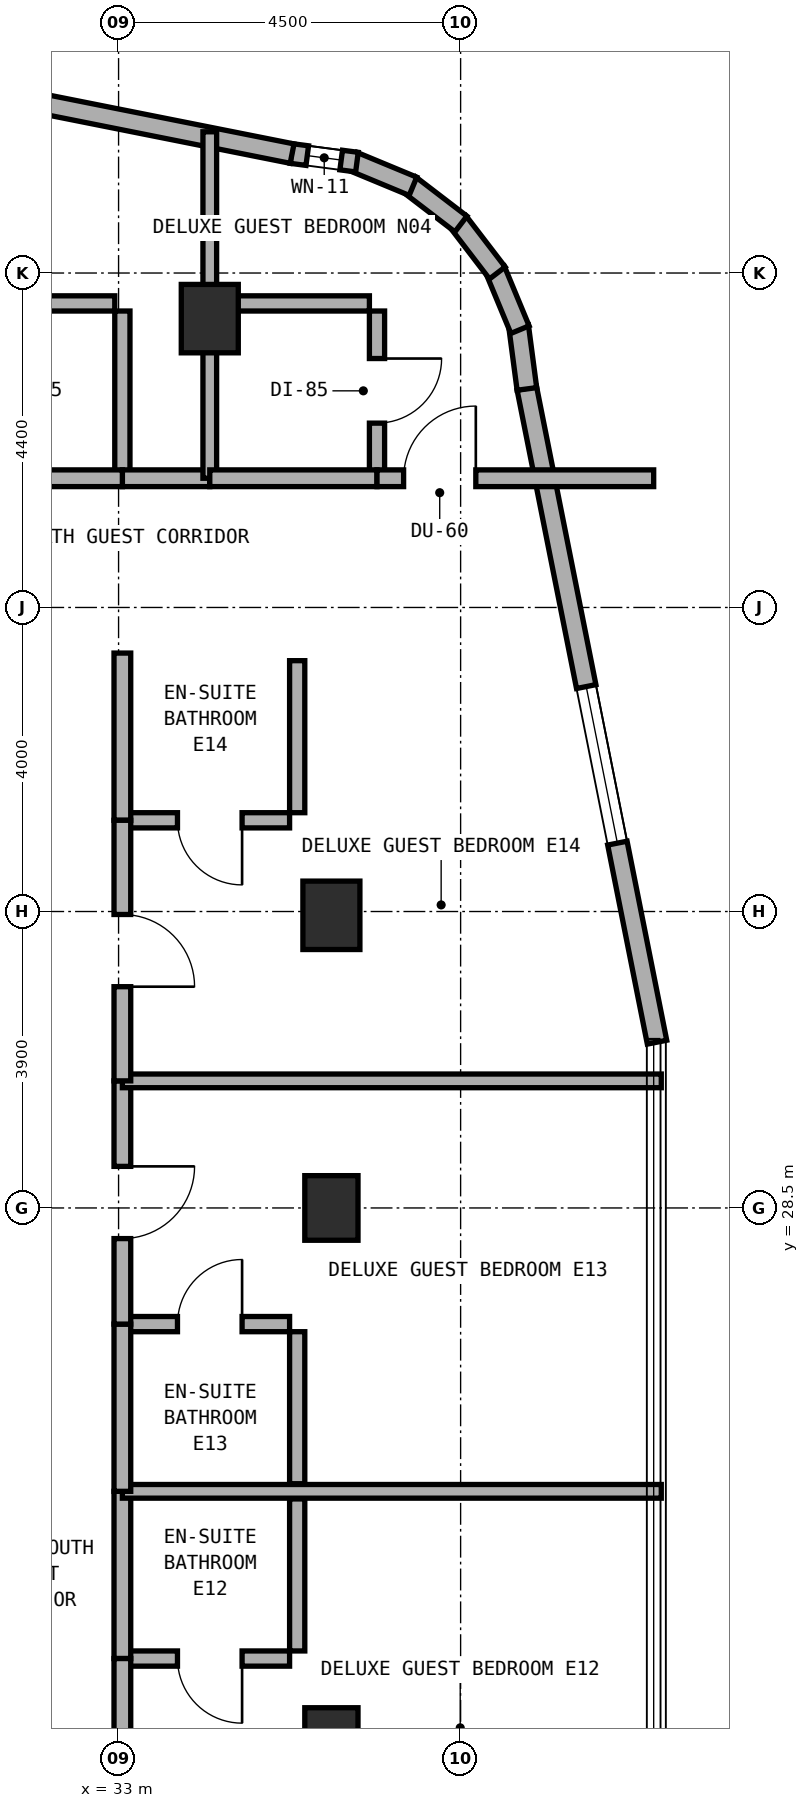
"""IFC4 building model, lengths in metres.
Left out: names, types, materials, properties, quantities, classifications, styles, units other than length and angle.
Written with IfcOpenShell. Run it as: python <this file> out.ifc"""

import sys

from ifc_helpers import new_model, si_unit, direction, frame, frame_2d, origin, origin_2d, place, context, subcontext, project, spatial, rectangle, extrude, element, fill, save


model = new_model("IFC4")
c1 = context("Model", 3, precision=1e-05, world=origin(), true_north=direction((0.0, 1.0)))
c2 = subcontext(c1, "Body", "Model", "MODEL_VIEW")
j1 = project(units=[si_unit("LENGTHUNIT", "METRE"), si_unit("PLANEANGLEUNIT", "RADIAN")], contexts=[c1])
p1 = place(None, origin())
s1 = spatial("IfcSite", under=j1, at=p1, CompositionType="ELEMENT")
p2 = place(p1, origin())
s2 = spatial("IfcBuilding", under=s1, at=p2, CompositionType="ELEMENT")
p3 = place(p2, frame((0.0, 0.0, 224.3)))
s3 = spatial("IfcBuildingStorey", under=s2, at=p3, CompositionType="ELEMENT", Elevation=224.3)
p4 = place(p3, frame((34.2, 40.2, 0.0), z_axis=(0.0, 0.0, 1.0), x_axis=(1.0, 0.0, 0.0)))
e1 = element("IfcColumn", 1, at=p4, inside=s3, PredefinedType="COLUMN", context=c2, shape_type="SweptSolid", body=[
    extrude(rectangle(XDim=0.75, YDim=0.9, at=origin_2d()), origin(), (0.0, 0.0, 1.0), 3.6),
])
for number, where, z_axis, x_axis in (
    (2, (35.8, 21.5, 0.0), (0.0, 0.0, 1.0), (1.0, 0.0, 0.0)),
    (3, (35.8, 28.5, 0.0), (0.0, 0.0, 1.0), (1.0, 0.0, 0.0)),
):
    element("IfcColumn", number, at=place(p3, frame(where, z_axis=z_axis, x_axis=x_axis)), inside=s3, PredefinedType="COLUMN", context=c2, shape_type="SweptSolid", body=[
        extrude(rectangle(XDim=0.7, YDim=0.85, at=origin_2d()), origin(), (0.0, 0.0, 1.0), 3.6),
    ])
p5 = place(p3, frame((35.8, 32.35, 0.0), z_axis=(0.0, 0.0, 1.0), x_axis=(1.0, 0.0, 0.0)))
e4 = element("IfcColumn", 4, at=p5, inside=s3, PredefinedType="COLUMN", context=c2, shape_type="SweptSolid", body=[
    extrude(rectangle(XDim=0.75, YDim=0.9, at=origin_2d()), origin(), (0.0, 0.0, 1.0), 3.6),
])
p6 = place(p3, frame((40.084, 30.681, 0.0), z_axis=(0.0, 0.0, 1.0), x_axis=(-0.195291715883, 0.980745199176, 0.0)))
e5 = element("IfcWall", 5, at=p6, inside=s3, PredefinedType="STANDARD", context=c2, shape_type="SweptSolid", body=[
    extrude(rectangle(XDim=8.771, YDim=0.26, at=frame_2d((4.385, 0.0))), origin(), (0.0, 0.0, 1.0), 3.32),
])
p7 = place(p6, frame((2.67, 0.0, 0.85)))
e6 = element("IfcOpeningElement", 6, at=p7, cuts=e5, PredefinedType="OPENING", context=c2, shape_type="SweptSolid", body=[
    extrude(rectangle(XDim=2.1, YDim=1.5, at=frame_2d((1.05, 0.75))), frame((0.0, 0.14, 0.0), z_axis=(0.0, -1.0, 0.0), x_axis=(1.0, 0.0, 0.0)), (0.0, 0.0, 1.0), 0.28),
])
p8 = place(p3, frame((38.372, 39.275, 0.0), z_axis=(0.0, 0.0, 1.0), x_axis=(-0.130954667764, 0.9913883573, 0.0)))
e7 = element("IfcWall", 7, at=p8, inside=s3, PredefinedType="STANDARD", context=c2, shape_type="SweptSolid", body=[
    extrude(rectangle(XDim=0.833, YDim=0.26, at=frame_2d((0.417, 0.0))), origin(), (0.0, 0.0, 1.0), 3.32),
])
p9 = place(p3, frame((38.281, 40.055, 0.0), z_axis=(0.0, 0.0, 1.0), x_axis=(-0.382985169477, 0.923754491172, 0.0)))
e8 = element("IfcWall", 8, at=p9, inside=s3, PredefinedType="STANDARD", context=c2, shape_type="SweptSolid", body=[
    extrude(rectangle(XDim=0.851, YDim=0.26, at=frame_2d((0.426, 0.0))), origin(), (0.0, 0.0, 1.0), 3.32),
])
for number, where, z_axis, x_axis in (
    (9, (37.983, 40.801, 0.0), (0.0, 0.0, 1.0), (-0.608, 0.794, 0.0)),
    (10, (37.504, 41.445, 0.0), (0.0, 0.0, 1.0), (-0.794, 0.608, 0.0)),
):
    element("IfcWall", number, at=place(p3, frame(where, z_axis=z_axis, x_axis=x_axis)), inside=s3, PredefinedType="STANDARD", context=c2, shape_type="SweptSolid", body=[
        extrude(rectangle(XDim=0.85, YDim=0.26, at=frame_2d((0.425, 0.0))), origin(), (0.0, 0.0, 1.0), 3.32),
    ])
p10 = place(p3, frame((36.873, 41.941, 0.0), z_axis=(0.0, 0.0, 1.0), x_axis=(-0.923652976167, 0.383229930484, 0.0)))
e11 = element("IfcWall", 11, at=p10, inside=s3, PredefinedType="STANDARD", context=c2, shape_type="SweptSolid", body=[
    extrude(rectangle(XDim=0.851, YDim=0.26, at=frame_2d((0.426, 0.0))), origin(), (0.0, 0.0, 1.0), 3.32),
])
p11 = place(p3, frame((36.136, 42.259, 0.0), z_axis=(0.0, 0.0, 1.0), x_axis=(-0.991493480548, 0.130156359936, 0.0)))
e12 = element("IfcWall", 12, at=p11, inside=s3, PredefinedType="STANDARD", context=c2, shape_type="SweptSolid", body=[
    extrude(rectangle(XDim=0.868, YDim=0.26, at=frame_2d((0.434, 0.0))), origin(), (0.0, 0.0, 1.0), 3.32),
])
p12 = place(p11, frame((0.209, 0.0, 0.85)))
e13 = element("IfcOpeningElement", 13, at=p12, cuts=e12, PredefinedType="OPENING", context=c2, shape_type="SweptSolid", body=[
    extrude(rectangle(XDim=0.45, YDim=1.5, at=frame_2d((0.225, 0.75))), frame((0.0, 0.14, 0.0), z_axis=(0.0, -1.0, 0.0), x_axis=(1.0, 0.0, 0.0)), (0.0, 0.0, 1.0), 0.28),
])
p13 = place(p3, frame((35.283, 42.371, 0.0), z_axis=(0.0, 0.0, 1.0), x_axis=(-0.980745199176, 0.195291715883, 0.0)))
e14 = element("IfcWall", 14, at=p13, inside=s3, PredefinedType="STANDARD", context=c2, shape_type="SweptSolid", body=[
    extrude(rectangle(XDim=8.771, YDim=0.26, at=frame_2d((4.385, 0.0))), origin(), (0.0, 0.0, 1.0), 3.32),
])
p14 = place(p13, frame((3.925, 0.0, 0.85)))
e15 = element("IfcOpeningElement", 15, at=p14, cuts=e14, PredefinedType="OPENING", context=c2, shape_type="SweptSolid", body=[
    extrude(rectangle(XDim=2.1, YDim=1.5, at=frame_2d((1.05, 0.75))), frame((0.0, 0.14, 0.0), z_axis=(0.0, -1.0, 0.0), x_axis=(1.0, 0.0, 0.0)), (0.0, 0.0, 1.0), 0.28),
])
p15 = place(p3, frame((30.95, 40.4, 0.0), z_axis=(0.0, 0.0, 1.0), x_axis=(1.0, 0.0, 0.0)))
e16 = element("IfcWall", 16, at=p15, inside=s3, PredefinedType="PLUMBINGWALL", context=c2, shape_type="SweptSolid", body=[
    extrude(rectangle(XDim=2.0, YDim=0.2, at=frame_2d((1.0, 0.0))), origin(), (0.0, 0.0, 1.0), 3.015),
])
p16 = place(p3, frame((33.05, 38.2, 0.0), z_axis=(0.0, 0.0, 1.0), x_axis=(0.0, 1.0, 0.0)))
e17 = element("IfcWall", 17, at=p16, inside=s3, PredefinedType="PLUMBINGWALL", context=c2, shape_type="SweptSolid", body=[
    extrude(rectangle(XDim=2.1, YDim=0.2, at=frame_2d((1.05, 0.0))), origin(), (0.0, 0.0, 1.0), 3.015),
])
p17 = place(p3, frame((33.05, 38.1, 0.0), z_axis=(0.0, 0.0, 1.0), x_axis=(1.0, 0.0, 0.0)))
e18 = element("IfcWall", 18, at=p17, inside=s3, PredefinedType="SOLIDWALL", context=c2, shape_type="SweptSolid", body=[
    extrude(rectangle(XDim=1.15, YDim=0.22, at=frame_2d((0.575, 0.0))), origin(), (0.0, 0.0, 1.0), 2.695),
])
p18 = place(p3, frame((30.85, 38.1, 0.0), z_axis=(0.0, 0.0, 1.0), x_axis=(1.0, 0.0, 0.0)))
e19 = element("IfcWall", 19, at=p18, inside=s3, PredefinedType="SOLIDWALL", context=c2, shape_type="SweptSolid", body=[
    extrude(rectangle(XDim=2.2, YDim=0.22, at=frame_2d((1.1, 0.0))), origin(), (0.0, 0.0, 1.0), 3.32),
])
p19 = place(p3, frame((34.2, 38.1, 0.0), z_axis=(0.0, 0.0, 1.0), x_axis=(0.0, 1.0, 0.0)))
e20 = element("IfcWall", 20, at=p19, inside=s3, PredefinedType="SOLIDWALL", context=c2, shape_type="SweptSolid", body=[
    extrude(rectangle(XDim=4.558, YDim=0.18, at=frame_2d((2.279, 0.0))), origin(), (0.0, 0.0, 1.0), 2.695),
])
p20 = place(p3, frame((36.4, 38.2, 0.0), z_axis=(0.0, 0.0, 1.0), x_axis=(0.0, 1.0, 0.0)))
e21 = element("IfcWall", 21, at=p20, inside=s3, PredefinedType="PLUMBINGWALL", context=c2, shape_type="SweptSolid", body=[
    extrude(rectangle(XDim=2.1, YDim=0.2, at=frame_2d((1.05, 0.0))), origin(), (0.0, 0.0, 1.0), 3.32),
])
p21 = place(p20, frame((0.625, 0.0, 0.0)))
e22 = element("IfcOpeningElement", 22, at=p21, cuts=e21, PredefinedType="OPENING", context=c2, shape_type="SweptSolid", body=[
    extrude(rectangle(XDim=0.85, YDim=2.1, at=frame_2d((0.425, 1.05))), frame((0.0, 0.11, 0.0), z_axis=(0.0, -1.0, 0.0), x_axis=(1.0, 0.0, 0.0)), (0.0, 0.0, 1.0), 0.22),
])
p22 = place(p3, frame((34.3, 40.4, 0.0), z_axis=(0.0, 0.0, 1.0), x_axis=(1.0, 0.0, 0.0)))
e23 = element("IfcWall", 23, at=p22, inside=s3, PredefinedType="PLUMBINGWALL", context=c2, shape_type="SweptSolid", body=[
    extrude(rectangle(XDim=2.0, YDim=0.2, at=frame_2d((1.0, 0.0))), origin(), (0.0, 0.0, 1.0), 3.32),
])
p23 = place(p3, frame((34.2, 38.1, 0.0), z_axis=(0.0, 0.0, 1.0), x_axis=(1.0, 0.0, 0.0)))
e24 = element("IfcWall", 24, at=p23, inside=s3, PredefinedType="SOLIDWALL", context=c2, shape_type="SweptSolid", body=[
    extrude(rectangle(XDim=2.2, YDim=0.22, at=frame_2d((1.1, 0.0))), origin(), (0.0, 0.0, 1.0), 2.695),
])
p24 = place(p3, frame((36.4, 38.1, 0.0), z_axis=(0.0, 0.0, 1.0), x_axis=(1.0, 0.0, 0.0)))
e25 = element("IfcWall", 25, at=p24, inside=s3, PredefinedType="SOLIDWALL", context=c2, shape_type="SweptSolid", body=[
    extrude(rectangle(XDim=3.64, YDim=0.22, at=frame_2d((1.82, 0.0))), origin(), (0.0, 0.0, 1.0), 3.32),
])
p25 = place(p24, frame((0.35, 0.0, 0.0)))
e26 = element("IfcOpeningElement", 26, at=p25, cuts=e25, PredefinedType="OPENING", context=c2, shape_type="SweptSolid", body=[
    extrude(rectangle(XDim=0.95, YDim=2.1, at=frame_2d((0.475, 1.05))), frame((0.0, 0.12, 0.0), z_axis=(0.0, -1.0, 0.0), x_axis=(1.0, 0.0, 0.0)), (0.0, 0.0, 1.0), 0.24),
])
p26 = place(p3, frame((33.15, 22.572, 0.0), z_axis=(0.0, 0.0, 1.0), x_axis=(1.0, 0.0, 0.0)))
e27 = element("IfcWall", 27, at=p26, inside=s3, PredefinedType="PLUMBINGWALL", context=c2, shape_type="SweptSolid", body=[
    extrude(rectangle(XDim=2.1, YDim=0.2, at=frame_2d((1.05, 0.0))), origin(), (0.0, 0.0, 1.0), 3.32),
])
p27 = place(p26, frame((0.625, 0.0, 0.0)))
e28 = element("IfcOpeningElement", 28, at=p27, cuts=e27, PredefinedType="OPENING", context=c2, shape_type="SweptSolid", body=[
    extrude(rectangle(XDim=0.85, YDim=2.1, at=frame_2d((0.425, 1.05))), frame((0.0, 0.11, 0.0), z_axis=(0.0, -1.0, 0.0), x_axis=(1.0, 0.0, 0.0)), (0.0, 0.0, 1.0), 0.22),
])
p28 = place(p3, frame((35.35, 22.672, 0.0), z_axis=(0.0, 0.0, 1.0), x_axis=(0.0, 1.0, 0.0)))
e29 = element("IfcWall", 29, at=p28, inside=s3, PredefinedType="PLUMBINGWALL", context=c2, shape_type="SweptSolid", body=[
    extrude(rectangle(XDim=2.0, YDim=0.2, at=frame_2d((1.0, 0.0))), origin(), (0.0, 0.0, 1.0), 3.32),
])
p29 = place(p3, frame((33.05, 22.572, 0.0), z_axis=(0.0, 0.0, 1.0), x_axis=(0.0, 1.0, 0.0)))
e30 = element("IfcWall", 30, at=p29, inside=s3, PredefinedType="SOLIDWALL", context=c2, shape_type="SweptSolid", body=[
    extrude(rectangle(XDim=2.2, YDim=0.22, at=frame_2d((1.1, 0.0))), origin(), (0.0, 0.0, 1.0), 3.32),
])
p30 = place(p3, frame((33.05, 19.156, 0.0), z_axis=(0.0, 0.0, 1.0), x_axis=(0.0, 1.0, 0.0)))
e31 = element("IfcWall", 31, at=p30, inside=s3, PredefinedType="SOLIDWALL", context=c2, shape_type="SweptSolid", body=[
    extrude(rectangle(XDim=3.416, YDim=0.22, at=frame_2d((1.708, 0.0))), origin(), (0.0, 0.0, 1.0), 2.695),
])
p31 = place(p30, frame((1.233, 0.0, 0.0)))
e32 = element("IfcOpeningElement", 32, at=p31, cuts=e31, PredefinedType="OPENING", context=c2, shape_type="SweptSolid", body=[
    extrude(rectangle(XDim=0.95, YDim=2.1, at=frame_2d((0.475, 1.05))), frame((0.0, 0.12, 0.0), z_axis=(0.0, -1.0, 0.0), x_axis=(1.0, 0.0, 0.0)), (0.0, 0.0, 1.0), 0.24),
])
p32 = place(p3, frame((33.05, 24.772, 0.0), z_axis=(0.0, 0.0, 1.0), x_axis=(1.0, 0.0, 0.0)))
e33 = element("IfcWall", 33, at=p32, inside=s3, PredefinedType="SOLIDWALL", context=c2, shape_type="SweptSolid", body=[
    extrude(rectangle(XDim=7.09, YDim=0.18, at=frame_2d((3.545, 0.0))), origin(), (0.0, 0.0, 1.0), 3.015),
])
p33 = place(p3, frame((33.15, 26.972, 0.0), z_axis=(0.0, 0.0, 1.0), x_axis=(1.0, 0.0, 0.0)))
e34 = element("IfcWall", 34, at=p33, inside=s3, PredefinedType="PLUMBINGWALL", context=c2, shape_type="SweptSolid", body=[
    extrude(rectangle(XDim=2.1, YDim=0.2, at=frame_2d((1.05, 0.0))), origin(), (0.0, 0.0, 1.0), 3.32),
])
p34 = place(p33, frame((0.625, 0.0, 0.0)))
e35 = element("IfcOpeningElement", 35, at=p34, cuts=e34, PredefinedType="OPENING", context=c2, shape_type="SweptSolid", body=[
    extrude(rectangle(XDim=0.85, YDim=2.1, at=frame_2d((0.425, 1.05))), frame((0.0, 0.11, 0.0), z_axis=(0.0, -1.0, 0.0), x_axis=(1.0, 0.0, 0.0)), (0.0, 0.0, 1.0), 0.22),
])
p35 = place(p3, frame((35.35, 24.872, 0.0), z_axis=(0.0, 0.0, 1.0), x_axis=(0.0, 1.0, 0.0)))
e36 = element("IfcWall", 36, at=p35, inside=s3, PredefinedType="PLUMBINGWALL", context=c2, shape_type="SweptSolid", body=[
    extrude(rectangle(XDim=2.0, YDim=0.2, at=frame_2d((1.0, 0.0))), origin(), (0.0, 0.0, 1.0), 3.32),
])
p36 = place(p3, frame((33.05, 24.772, 0.0), z_axis=(0.0, 0.0, 1.0), x_axis=(0.0, 1.0, 0.0)))
e37 = element("IfcWall", 37, at=p36, inside=s3, PredefinedType="SOLIDWALL", context=c2, shape_type="SweptSolid", body=[
    extrude(rectangle(XDim=2.2, YDim=0.22, at=frame_2d((1.1, 0.0))), origin(), (0.0, 0.0, 1.0), 3.32),
])
p37 = place(p3, frame((33.05, 26.972, 0.0), z_axis=(0.0, 0.0, 1.0), x_axis=(0.0, 1.0, 0.0)))
e38 = element("IfcWall", 38, at=p37, inside=s3, PredefinedType="SOLIDWALL", context=c2, shape_type="SweptSolid", body=[
    extrude(rectangle(XDim=3.2, YDim=0.22, at=frame_2d((1.6, 0.0))), origin(), (0.0, 0.0, 1.0), 2.695),
])
p38 = place(p37, frame((1.125, 0.0, 0.0)))
e39 = element("IfcOpeningElement", 39, at=p38, cuts=e38, PredefinedType="OPENING", context=c2, shape_type="SweptSolid", body=[
    extrude(rectangle(XDim=0.95, YDim=2.1, at=frame_2d((0.475, 1.05))), frame((0.0, 0.12, 0.0), z_axis=(0.0, -1.0, 0.0), x_axis=(1.0, 0.0, 0.0)), (0.0, 0.0, 1.0), 0.24),
])
p39 = place(p3, frame((33.05, 30.172, 0.0), z_axis=(0.0, 0.0, 1.0), x_axis=(1.0, 0.0, 0.0)))
e40 = element("IfcWall", 40, at=p39, inside=s3, PredefinedType="SOLIDWALL", context=c2, shape_type="SweptSolid", body=[
    extrude(rectangle(XDim=7.09, YDim=0.18, at=frame_2d((3.545, 0.0))), origin(), (0.0, 0.0, 1.0), 3.015),
])
p40 = place(p3, frame((33.15, 33.6, 0.0), z_axis=(0.0, 0.0, 1.0), x_axis=(1.0, 0.0, 0.0)))
e41 = element("IfcWall", 41, at=p40, inside=s3, PredefinedType="PLUMBINGWALL", context=c2, shape_type="SweptSolid", body=[
    extrude(rectangle(XDim=2.1, YDim=0.2, at=frame_2d((1.05, 0.0))), origin(), (0.0, 0.0, 1.0), 3.32),
])
p41 = place(p40, frame((0.625, 0.0, 0.0)))
e42 = element("IfcOpeningElement", 42, at=p41, cuts=e41, PredefinedType="OPENING", context=c2, shape_type="SweptSolid", body=[
    extrude(rectangle(XDim=0.85, YDim=2.1, at=frame_2d((0.425, 1.05))), frame((0.0, 0.11, 0.0), z_axis=(0.0, -1.0, 0.0), x_axis=(1.0, 0.0, 0.0)), (0.0, 0.0, 1.0), 0.22),
])
p42 = place(p3, frame((35.35, 33.7, 0.0), z_axis=(0.0, 0.0, 1.0), x_axis=(0.0, 1.0, 0.0)))
e43 = element("IfcWall", 43, at=p42, inside=s3, PredefinedType="PLUMBINGWALL", context=c2, shape_type="SweptSolid", body=[
    extrude(rectangle(XDim=2.0, YDim=0.2, at=frame_2d((1.0, 0.0))), origin(), (0.0, 0.0, 1.0), 3.015),
])
p43 = place(p3, frame((33.05, 33.6, 0.0), z_axis=(0.0, 0.0, 1.0), x_axis=(0.0, 1.0, 0.0)))
e44 = element("IfcWall", 44, at=p43, inside=s3, PredefinedType="SOLIDWALL", context=c2, shape_type="SweptSolid", body=[
    extrude(rectangle(XDim=2.2, YDim=0.22, at=frame_2d((1.1, 0.0))), origin(), (0.0, 0.0, 1.0), 3.32),
])
p44 = place(p3, frame((33.05, 30.172, 0.0), z_axis=(0.0, 0.0, 1.0), x_axis=(0.0, 1.0, 0.0)))
e45 = element("IfcWall", 45, at=p44, inside=s3, PredefinedType="SOLIDWALL", context=c2, shape_type="SweptSolid", body=[
    extrude(rectangle(XDim=3.428, YDim=0.22, at=frame_2d((1.714, 0.0))), origin(), (0.0, 0.0, 1.0), 2.695),
])
p45 = place(p44, frame((1.239, 0.0, 0.0)))
e46 = element("IfcOpeningElement", 46, at=p45, cuts=e45, PredefinedType="OPENING", context=c2, shape_type="SweptSolid", body=[
    extrude(rectangle(XDim=0.95, YDim=2.1, at=frame_2d((0.475, 1.05))), frame((0.0, 0.12, 0.0), z_axis=(0.0, -1.0, 0.0), x_axis=(1.0, 0.0, 0.0)), (0.0, 0.0, 1.0), 0.24),
])
p46 = place(p7, origin())
e47 = element("IfcWindow", 47, at=p46, inside=s3, PartitioningType="SINGLE_PANEL", PredefinedType="WINDOW", context=c2, shape_type="SweptSolid", body=[
    extrude(rectangle(XDim=2.1, YDim=1.5, at=frame_2d((1.05, 0.75))), frame((0.0, 0.03, 0.0), z_axis=(0.0, -1.0, 0.0), x_axis=(1.0, 0.0, 0.0)), (0.0, 0.0, 1.0), 0.06),
])
fill(e6, e47)
p47 = place(p12, origin())
e48 = element("IfcWindow", 48, at=p47, inside=s3, PartitioningType="SINGLE_PANEL", PredefinedType="WINDOW", context=c2, shape_type="SweptSolid", body=[
    extrude(rectangle(XDim=0.45, YDim=1.5, at=frame_2d((0.225, 0.75))), frame((0.0, 0.03, 0.0), z_axis=(0.0, -1.0, 0.0), x_axis=(1.0, 0.0, 0.0)), (0.0, 0.0, 1.0), 0.06),
])
fill(e13, e48)
p48 = place(p21, frame((0.85, 0.0, 0.0), z_axis=(0.0, 0.0, 1.0), x_axis=(-1.0, 0.0, 0.0)))
e49 = element("IfcDoor", 49, at=p48, inside=s3, OperationType="SINGLE_SWING_LEFT", PredefinedType="DOOR", context=c2, shape_type="SweptSolid", body=[
    extrude(rectangle(XDim=0.85, YDim=2.1, at=frame_2d((0.425, 1.05))), frame((0.0, 0.025, 0.0), z_axis=(0.0, -1.0, 0.0), x_axis=(1.0, 0.0, 0.0)), (0.0, 0.0, 1.0), 0.05),
])
fill(e22, e49)
p49 = place(p25, origin())
e50 = element("IfcDoor", 50, at=p49, inside=s3, OperationType="SINGLE_SWING_RIGHT", PredefinedType="DOOR", context=c2, shape_type="SweptSolid", body=[
    extrude(rectangle(XDim=0.95, YDim=2.1, at=frame_2d((0.475, 1.05))), frame((0.0, 0.025, 0.0), z_axis=(0.0, -1.0, 0.0), x_axis=(1.0, 0.0, 0.0)), (0.0, 0.0, 1.0), 0.05),
])
fill(e26, e50)
p50 = place(p27, frame((0.85, 0.0, 0.0), z_axis=(0.0, 0.0, 1.0), x_axis=(-1.0, 0.0, 0.0)))
e51 = element("IfcDoor", 51, at=p50, inside=s3, OperationType="SINGLE_SWING_LEFT", PredefinedType="DOOR", context=c2, shape_type="SweptSolid", body=[
    extrude(rectangle(XDim=0.85, YDim=2.1, at=frame_2d((0.425, 1.05))), frame((0.0, 0.025, 0.0), z_axis=(0.0, -1.0, 0.0), x_axis=(1.0, 0.0, 0.0)), (0.0, 0.0, 1.0), 0.05),
])
fill(e28, e51)
p51 = place(p34, origin())
e52 = element("IfcDoor", 52, at=p51, inside=s3, OperationType="SINGLE_SWING_RIGHT", PredefinedType="DOOR", context=c2, shape_type="SweptSolid", body=[
    extrude(rectangle(XDim=0.85, YDim=2.1, at=frame_2d((0.425, 1.05))), frame((0.0, 0.025, 0.0), z_axis=(0.0, -1.0, 0.0), x_axis=(1.0, 0.0, 0.0)), (0.0, 0.0, 1.0), 0.05),
])
fill(e35, e52)
p52 = place(p38, frame((0.95, 0.0, 0.0), z_axis=(0.0, 0.0, 1.0), x_axis=(-1.0, 0.0, 0.0)))
e53 = element("IfcDoor", 53, at=p52, inside=s3, OperationType="SINGLE_SWING_LEFT", PredefinedType="DOOR", context=c2, shape_type="SweptSolid", body=[
    extrude(rectangle(XDim=0.95, YDim=2.1, at=frame_2d((0.475, 1.05))), frame((0.0, 0.025, 0.0), z_axis=(0.0, -1.0, 0.0), x_axis=(1.0, 0.0, 0.0)), (0.0, 0.0, 1.0), 0.05),
])
fill(e39, e53)
p53 = place(p41, frame((0.85, 0.0, 0.0), z_axis=(0.0, 0.0, 1.0), x_axis=(-1.0, 0.0, 0.0)))
e54 = element("IfcDoor", 54, at=p53, inside=s3, OperationType="SINGLE_SWING_LEFT", PredefinedType="DOOR", context=c2, shape_type="SweptSolid", body=[
    extrude(rectangle(XDim=0.85, YDim=2.1, at=frame_2d((0.425, 1.05))), frame((0.0, 0.025, 0.0), z_axis=(0.0, -1.0, 0.0), x_axis=(1.0, 0.0, 0.0)), (0.0, 0.0, 1.0), 0.05),
])
fill(e42, e54)
p54 = place(p45, frame((0.95, 0.0, 0.0), z_axis=(0.0, 0.0, 1.0), x_axis=(-1.0, 0.0, 0.0)))
e55 = element("IfcDoor", 55, at=p54, inside=s3, OperationType="SINGLE_SWING_RIGHT", PredefinedType="DOOR", context=c2, shape_type="SweptSolid", body=[
    extrude(rectangle(XDim=0.95, YDim=2.1, at=frame_2d((0.475, 1.05))), frame((0.0, 0.025, 0.0), z_axis=(0.0, -1.0, 0.0), x_axis=(1.0, 0.0, 0.0)), (0.0, 0.0, 1.0), 0.05),
])
fill(e46, e55)
save(model, sys.argv[1])
